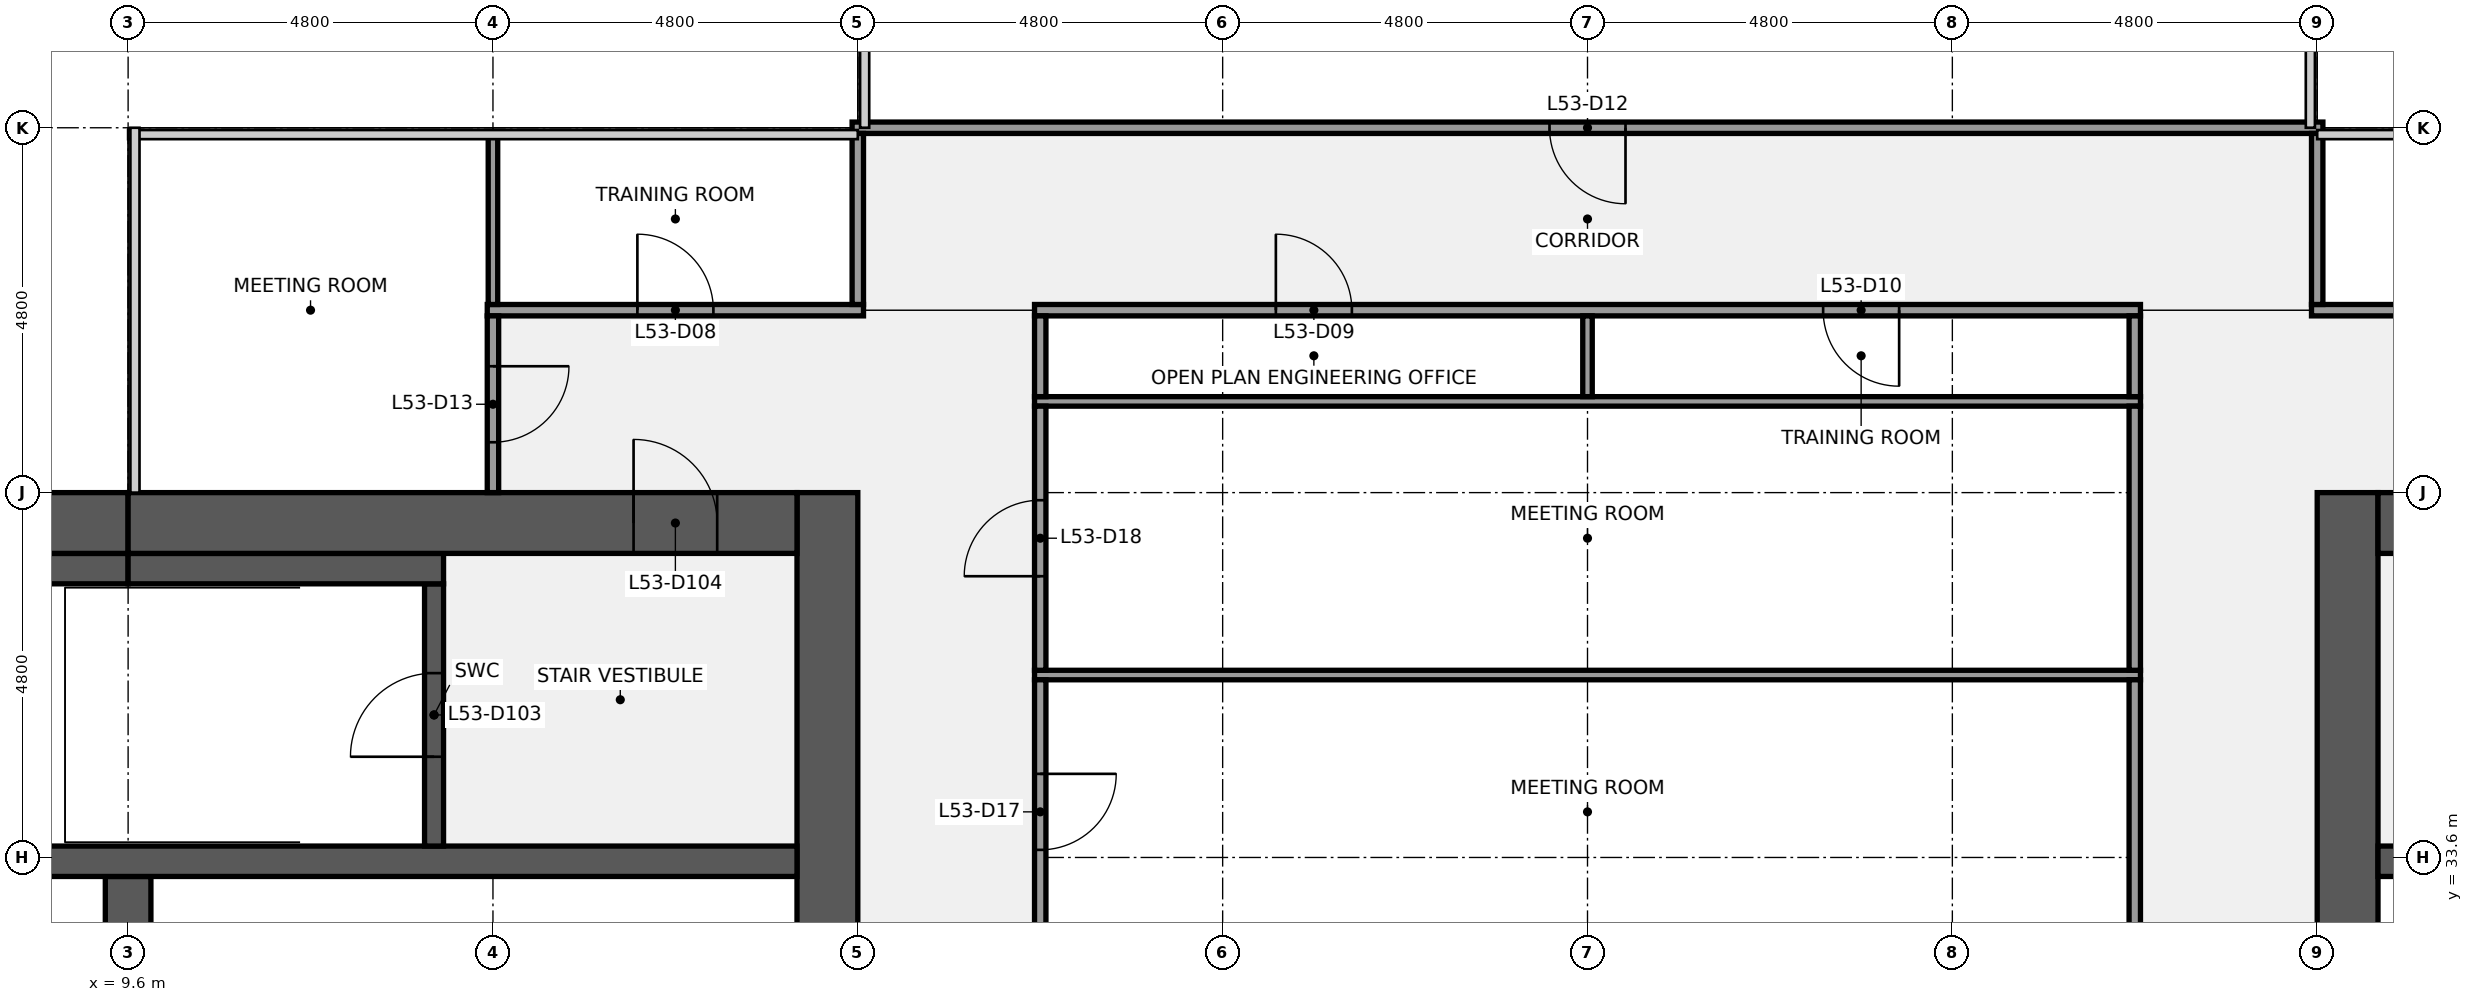
"""IFC4 building model, lengths in metres.
Left out: names, types, materials, properties, quantities, classifications, styles, units other than length and angle.
Written with IfcOpenShell. Run it as: python <this file> out.ifc"""

import sys

from ifc_helpers import new_model, si_unit, direction, frame, frame_2d, origin, place, context, subcontext, project, spatial, rectangle, extrude, element, fill, save


model = new_model("IFC4")
c1 = context("Model", 3, precision=1e-05, world=origin(), true_north=direction((0.0, 1.0)))
c2 = subcontext(c1, "Body", "Model", "MODEL_VIEW")
j1 = project(units=[si_unit("LENGTHUNIT", "METRE"), si_unit("PLANEANGLEUNIT", "RADIAN")], contexts=[c1])
p1 = place(None, origin())
s1 = spatial("IfcSite", under=j1, at=p1, CompositionType="ELEMENT")
p2 = place(p1, origin())
s2 = spatial("IfcBuilding", under=s1, at=p2, CompositionType="ELEMENT")
p3 = place(p2, frame((0.0, 0.0, 241.2)))
s3 = spatial("IfcBuildingStorey", under=s2, at=p3, CompositionType="ELEMENT", Elevation=241.2)
p4 = place(p3, frame((18.8, 38.4, 0.0), z_axis=(0.0, 0.0, 1.0), x_axis=(0.0, -1.0, 0.0)))
e1 = element("IfcWall", 1, at=p4, inside=s3, PredefinedType="SHEAR", context=c2, shape_type="SweptSolid", body=[
    extrude(rectangle(XDim=28.8, YDim=0.8, at=frame_2d((14.4, 0.0))), origin(), (0.0, 0.0, 1.0), 3.84),
])
p5 = place(p4, frame((18.3, 0.0, 0.0)))
e2 = element("IfcOpeningElement", 2, at=p5, cuts=e1, PredefinedType="OPENING", context=c2, shape_type="SweptSolid", body=[
    extrude(rectangle(XDim=1.8, YDim=2.1, at=frame_2d((0.9, 1.05))), frame((0.0, 0.41, 0.0), z_axis=(0.0, -1.0, 0.0), x_axis=(1.0, 0.0, 0.0)), (0.0, 0.0, 1.0), 0.82),
])
p6 = place(p4, frame((8.7, 0.0, 0.0)))
e3 = element("IfcOpeningElement", 3, at=p6, cuts=e1, PredefinedType="OPENING", context=c2, shape_type="SweptSolid", body=[
    extrude(rectangle(XDim=1.8, YDim=2.1, at=frame_2d((0.9, 1.05))), frame((0.0, 0.41, 0.0), z_axis=(0.0, -1.0, 0.0), x_axis=(1.0, 0.0, 0.0)), (0.0, 0.0, 1.0), 0.82),
])
p7 = place(p3, frame((9.6, 30.75, 0.0), z_axis=(0.0, 0.0, 1.0), x_axis=(0.0, 1.0, 0.0)))
e4 = element("IfcWall", 4, at=p7, inside=s3, PredefinedType="SHEAR", context=c2, shape_type="SweptSolid", body=[
    extrude(rectangle(XDim=2.6, YDim=0.6, at=frame_2d((1.3, 0.0))), origin(), (0.0, 0.0, 1.0), 3.84),
])
p8 = place(p3, frame((0.8, 33.55, 0.0), z_axis=(0.0, 0.0, 1.0), x_axis=(1.0, 0.0, 0.0)))
e5 = element("IfcWall", 5, at=p8, inside=s3, PredefinedType="SHEAR", context=c2, shape_type="SweptSolid", body=[
    extrude(rectangle(XDim=17.6, YDim=0.4, at=frame_2d((8.8, 0.0))), origin(), (0.0, 0.0, 1.0), 3.84),
])
p9 = place(p3, frame((13.625, 33.75, 0.0), z_axis=(0.0, 0.0, 1.0), x_axis=(0.0, 1.0, 0.0)))
e6 = element("IfcWall", 6, at=p9, inside=s3, PredefinedType="SHEAR", context=c2, shape_type="SweptSolid", body=[
    extrude(rectangle(XDim=3.45, YDim=0.25, at=frame_2d((1.725, 0.0))), origin(), (0.0, 0.0, 1.0), 3.84),
])
p10 = place(p9, frame((1.175, 0.0, 0.0)))
e7 = element("IfcOpeningElement", 7, at=p10, cuts=e6, PredefinedType="OPENING", context=c2, shape_type="SweptSolid", body=[
    extrude(rectangle(XDim=1.1, YDim=2.1, at=frame_2d((0.55, 1.05))), frame((0.0, 0.135, 0.0), z_axis=(0.0, -1.0, 0.0), x_axis=(1.0, 0.0, 0.0)), (0.0, 0.0, 1.0), 0.27),
])
p11 = place(p3, frame((6.25, 37.4, 0.0), z_axis=(0.0, 0.0, 1.0), x_axis=(1.0, 0.0, 0.0)))
e8 = element("IfcWall", 8, at=p11, inside=s3, PredefinedType="SHEAR", context=c2, shape_type="SweptSolid", body=[
    extrude(rectangle(XDim=3.35, YDim=0.4, at=frame_2d((1.675, 0.0))), origin(), (0.0, 0.0, 1.0), 3.84),
])
p12 = place(p3, frame((9.6, 37.4, 0.0), z_axis=(0.0, 0.0, 1.0), x_axis=(1.0, 0.0, 0.0)))
e9 = element("IfcWall", 9, at=p12, inside=s3, PredefinedType="SHEAR", context=c2, shape_type="SweptSolid", body=[
    extrude(rectangle(XDim=4.15, YDim=0.4, at=frame_2d((2.075, 0.0))), origin(), (0.0, 0.0, 1.0), 3.84),
])
p13 = place(p3, frame((0.8, 38.0, 0.0), z_axis=(0.0, 0.0, 1.0), x_axis=(1.0, 0.0, 0.0)))
e10 = element("IfcWall", 10, at=p13, inside=s3, PredefinedType="SHEAR", context=c2, shape_type="SweptSolid", body=[
    extrude(rectangle(XDim=8.8, YDim=0.8, at=frame_2d((4.4, 0.0))), origin(), (0.0, 0.0, 1.0), 3.84),
])
p14 = place(p13, frame((5.5, 0.0, 0.9)))
e11 = element("IfcOpeningElement", 11, at=p14, cuts=e10, PredefinedType="OPENING", context=c2, shape_type="SweptSolid", body=[
    extrude(rectangle(XDim=1.8, YDim=1.5, at=frame_2d((0.9, 0.75))), frame((0.0, 0.41, 0.0), z_axis=(0.0, -1.0, 0.0), x_axis=(1.0, 0.0, 0.0)), (0.0, 0.0, 1.0), 0.82),
])
p15 = place(p3, frame((9.6, 38.0, 0.0), z_axis=(0.0, 0.0, 1.0), x_axis=(1.0, 0.0, 0.0)))
e12 = element("IfcWall", 12, at=p15, inside=s3, PredefinedType="SHEAR", context=c2, shape_type="SweptSolid", body=[
    extrude(rectangle(XDim=8.8, YDim=0.8, at=frame_2d((4.4, 0.0))), origin(), (0.0, 0.0, 1.0), 3.84),
])
p16 = place(p15, frame((6.65, 0.0, 0.0)))
e13 = element("IfcOpeningElement", 13, at=p16, cuts=e12, PredefinedType="OPENING", context=c2, shape_type="SweptSolid", body=[
    extrude(rectangle(XDim=1.1, YDim=2.1, at=frame_2d((0.55, 1.05))), frame((0.0, 0.41, 0.0), z_axis=(0.0, -1.0, 0.0), x_axis=(1.0, 0.0, 0.0)), (0.0, 0.0, 1.0), 0.82),
])
p17 = place(p3, frame((38.8, 9.6, 0.0), z_axis=(0.0, 0.0, 1.0), x_axis=(0.0, 1.0, 0.0)))
e14 = element("IfcWall", 14, at=p17, inside=s3, PredefinedType="SHEAR", context=c2, shape_type="SweptSolid", body=[
    extrude(rectangle(XDim=28.8, YDim=0.8, at=frame_2d((14.4, 0.0))), origin(), (0.0, 0.0, 1.0), 3.84),
])
p18 = place(p17, frame((8.7, 0.0, 0.0)))
e15 = element("IfcOpeningElement", 15, at=p18, cuts=e14, PredefinedType="OPENING", context=c2, shape_type="SweptSolid", body=[
    extrude(rectangle(XDim=1.8, YDim=2.1, at=frame_2d((0.9, 1.05))), frame((0.0, 0.41, 0.0), z_axis=(0.0, -1.0, 0.0), x_axis=(1.0, 0.0, 0.0)), (0.0, 0.0, 1.0), 0.82),
])
p19 = place(p17, frame((18.3, 0.0, 0.0)))
e16 = element("IfcOpeningElement", 16, at=p19, cuts=e14, PredefinedType="OPENING", context=c2, shape_type="SweptSolid", body=[
    extrude(rectangle(XDim=1.8, YDim=2.1, at=frame_2d((0.9, 1.05))), frame((0.0, 0.41, 0.0), z_axis=(0.0, -1.0, 0.0), x_axis=(1.0, 0.0, 0.0)), (0.0, 0.0, 1.0), 0.82),
])
p20 = place(p3, frame((39.2, 33.55, 0.0), z_axis=(0.0, 0.0, 1.0), x_axis=(1.0, 0.0, 0.0)))
e17 = element("IfcWall", 17, at=p20, inside=s3, PredefinedType="SHEAR", context=c2, shape_type="SweptSolid", body=[
    extrude(rectangle(XDim=17.6, YDim=0.4, at=frame_2d((8.8, 0.0))), origin(), (0.0, 0.0, 1.0), 3.84),
])
p21 = place(p3, frame((39.2, 38.0, 0.0), z_axis=(0.0, 0.0, 1.0), x_axis=(1.0, 0.0, 0.0)))
e18 = element("IfcWall", 18, at=p21, inside=s3, PredefinedType="SHEAR", context=c2, shape_type="SweptSolid", body=[
    extrude(rectangle(XDim=8.8, YDim=0.8, at=frame_2d((4.4, 0.0))), origin(), (0.0, 0.0, 1.0), 3.84),
])
p22 = place(p21, frame((1.05, 0.0, 0.0)))
e19 = element("IfcOpeningElement", 19, at=p22, cuts=e18, PredefinedType="OPENING", context=c2, shape_type="SweptSolid", body=[
    extrude(rectangle(XDim=1.1, YDim=2.1, at=frame_2d((0.55, 1.05))), frame((0.0, 0.41, 0.0), z_axis=(0.0, -1.0, 0.0), x_axis=(1.0, 0.0, 0.0)), (0.0, 0.0, 1.0), 0.82),
])
for number, where, z_axis, x_axis in (
    (20, (21.525, 36.0, 0.0), (0.0, 0.0, 1.0), (1.0, 0.0, 0.0)),
    (21, (21.525, 39.6, 0.0), (0.0, 0.0, 1.0), (1.0, 0.0, 0.0)),
):
    element("IfcWall", number, at=place(p3, frame(where, z_axis=z_axis, x_axis=x_axis)), inside=s3, PredefinedType="PARTITIONING", context=c2, shape_type="SweptSolid", body=[
        extrude(rectangle(XDim=14.55, YDim=0.125, at=frame_2d((7.275, 0.0))), origin(), (0.0, 0.0, 1.0), 2.849),
    ])
p23 = place(p3, frame((14.325, 40.8, 0.0), z_axis=(0.0, 0.0, 1.0), x_axis=(1.0, 0.0, 0.0)))
e22 = element("IfcWall", 22, at=p23, inside=s3, PredefinedType="PARTITIONING", context=c2, shape_type="SweptSolid", body=[
    extrude(rectangle(XDim=4.95, YDim=0.15, at=frame_2d((2.475, 0.0))), origin(), (0.0, 0.0, 1.0), 2.849),
])
p24 = place(p23, frame((1.975, 0.0, 0.0)))
e23 = element("IfcOpeningElement", 23, at=p24, cuts=e22, PredefinedType="OPENING", context=c2, shape_type="SweptSolid", body=[
    extrude(rectangle(XDim=1.0, YDim=2.1, at=frame_2d((0.5, 1.05))), frame((0.0, 0.085, 0.0), z_axis=(0.0, -1.0, 0.0), x_axis=(1.0, 0.0, 0.0)), (0.0, 0.0, 1.0), 0.17),
])
p25 = place(p3, frame((21.525, 40.8, 0.0), z_axis=(0.0, 0.0, 1.0), x_axis=(1.0, 0.0, 0.0)))
e24 = element("IfcWall", 24, at=p25, inside=s3, PredefinedType="PARTITIONING", context=c2, shape_type="SweptSolid", body=[
    extrude(rectangle(XDim=14.55, YDim=0.15, at=frame_2d((7.275, 0.0))), origin(), (0.0, 0.0, 1.0), 2.849),
])
p26 = place(p25, frame((3.175, 0.0, 0.0)))
e25 = element("IfcOpeningElement", 25, at=p26, cuts=e24, PredefinedType="OPENING", context=c2, shape_type="SweptSolid", body=[
    extrude(rectangle(XDim=1.0, YDim=2.1, at=frame_2d((0.5, 1.05))), frame((0.0, 0.085, 0.0), z_axis=(0.0, -1.0, 0.0), x_axis=(1.0, 0.0, 0.0)), (0.0, 0.0, 1.0), 0.17),
])
p27 = place(p25, frame((10.375, 0.0, 0.0)))
e26 = element("IfcOpeningElement", 26, at=p27, cuts=e24, PredefinedType="OPENING", context=c2, shape_type="SweptSolid", body=[
    extrude(rectangle(XDim=1.0, YDim=2.1, at=frame_2d((0.5, 1.05))), frame((0.0, 0.085, 0.0), z_axis=(0.0, -1.0, 0.0), x_axis=(1.0, 0.0, 0.0)), (0.0, 0.0, 1.0), 0.17),
])
p28 = place(p3, frame((38.325, 40.8, 0.0), z_axis=(0.0, 0.0, 1.0), x_axis=(1.0, 0.0, 0.0)))
e27 = element("IfcWall", 27, at=p28, inside=s3, PredefinedType="PARTITIONING", context=c2, shape_type="SweptSolid", body=[
    extrude(rectangle(XDim=4.95, YDim=0.15, at=frame_2d((2.475, 0.0))), origin(), (0.0, 0.0, 1.0), 2.849),
])
p29 = place(p28, frame((1.975, 0.0, 0.0)))
e28 = element("IfcOpeningElement", 28, at=p29, cuts=e27, PredefinedType="OPENING", context=c2, shape_type="SweptSolid", body=[
    extrude(rectangle(XDim=1.0, YDim=2.1, at=frame_2d((0.5, 1.05))), frame((0.0, 0.085, 0.0), z_axis=(0.0, -1.0, 0.0), x_axis=(1.0, 0.0, 0.0)), (0.0, 0.0, 1.0), 0.17),
])
p30 = place(p3, frame((19.125, 43.2, 0.0), z_axis=(0.0, 0.0, 1.0), x_axis=(1.0, 0.0, 0.0)))
e29 = element("IfcWall", 29, at=p30, inside=s3, PredefinedType="PARTITIONING", context=c2, shape_type="SweptSolid", body=[
    extrude(rectangle(XDim=19.35, YDim=0.15, at=frame_2d((9.675, 0.0))), origin(), (0.0, 0.0, 1.0), 2.849),
])
p31 = place(p30, frame((9.175, 0.0, 0.0)))
e30 = element("IfcOpeningElement", 30, at=p31, cuts=e29, PredefinedType="OPENING", context=c2, shape_type="SweptSolid", body=[
    extrude(rectangle(XDim=1.0, YDim=2.1, at=frame_2d((0.5, 1.05))), frame((0.0, 0.085, 0.0), z_axis=(0.0, -1.0, 0.0), x_axis=(1.0, 0.0, 0.0)), (0.0, 0.0, 1.0), 0.17),
])
p32 = place(p3, frame((14.4, 40.875, 0.0), z_axis=(0.0, 0.0, 1.0), x_axis=(0.0, 1.0, 0.0)))
e31 = element("IfcWall", 31, at=p32, inside=s3, PredefinedType="PARTITIONING", context=c2, shape_type="SweptSolid", body=[
    extrude(rectangle(XDim=2.225, YDim=0.125, at=frame_2d((1.113, 0.0))), origin(), (0.0, 0.0, 1.0), 2.849),
])
p33 = place(p3, frame((14.4, 38.4, 0.0), z_axis=(0.0, 0.0, 1.0), x_axis=(0.0, 1.0, 0.0)))
e32 = element("IfcWall", 32, at=p33, inside=s3, PredefinedType="PARTITIONING", context=c2, shape_type="SweptSolid", body=[
    extrude(rectangle(XDim=2.325, YDim=0.15, at=frame_2d((1.163, 0.0))), origin(), (0.0, 0.0, 1.0), 2.849),
])
p34 = place(p33, frame((0.663, 0.0, 0.0)))
e33 = element("IfcOpeningElement", 33, at=p34, cuts=e32, PredefinedType="OPENING", context=c2, shape_type="SweptSolid", body=[
    extrude(rectangle(XDim=1.0, YDim=2.1, at=frame_2d((0.5, 1.05))), frame((0.0, 0.085, 0.0), z_axis=(0.0, -1.0, 0.0), x_axis=(1.0, 0.0, 0.0)), (0.0, 0.0, 1.0), 0.17),
])
p35 = place(p3, frame((19.2, 40.875, 0.0), z_axis=(0.0, 0.0, 1.0), x_axis=(0.0, 1.0, 0.0)))
e34 = element("IfcWall", 34, at=p35, inside=s3, PredefinedType="PARTITIONING", context=c2, shape_type="SweptSolid", body=[
    extrude(rectangle(XDim=2.25, YDim=0.15, at=frame_2d((1.125, 0.0))), origin(), (0.0, 0.0, 1.0), 2.849),
])
p36 = place(p3, frame((21.6, 32.462, 0.0), z_axis=(0.0, 0.0, 1.0), x_axis=(0.0, 1.0, 0.0)))
e35 = element("IfcWall", 35, at=p36, inside=s3, PredefinedType="PARTITIONING", context=c2, shape_type="SweptSolid", body=[
    extrude(rectangle(XDim=3.475, YDim=0.15, at=frame_2d((1.738, 0.0))), origin(), (0.0, 0.0, 1.0), 2.849),
])
p37 = place(p36, frame((1.238, 0.0, 0.0)))
e36 = element("IfcOpeningElement", 36, at=p37, cuts=e35, PredefinedType="OPENING", context=c2, shape_type="SweptSolid", body=[
    extrude(rectangle(XDim=1.0, YDim=2.1, at=frame_2d((0.5, 1.05))), frame((0.0, 0.085, 0.0), z_axis=(0.0, -1.0, 0.0), x_axis=(1.0, 0.0, 0.0)), (0.0, 0.0, 1.0), 0.17),
])
p38 = place(p3, frame((21.6, 36.062, 0.0), z_axis=(0.0, 0.0, 1.0), x_axis=(0.0, 1.0, 0.0)))
e37 = element("IfcWall", 37, at=p38, inside=s3, PredefinedType="PARTITIONING", context=c2, shape_type="SweptSolid", body=[
    extrude(rectangle(XDim=3.475, YDim=0.15, at=frame_2d((1.738, 0.0))), origin(), (0.0, 0.0, 1.0), 2.849),
])
p39 = place(p38, frame((1.238, 0.0, 0.0)))
e38 = element("IfcOpeningElement", 38, at=p39, cuts=e37, PredefinedType="OPENING", context=c2, shape_type="SweptSolid", body=[
    extrude(rectangle(XDim=1.0, YDim=2.1, at=frame_2d((0.5, 1.05))), frame((0.0, 0.085, 0.0), z_axis=(0.0, -1.0, 0.0), x_axis=(1.0, 0.0, 0.0)), (0.0, 0.0, 1.0), 0.17),
])
p40 = place(p3, frame((21.6, 39.663, 0.0), z_axis=(0.0, 0.0, 1.0), x_axis=(0.0, 1.0, 0.0)))
e39 = element("IfcWall", 39, at=p40, inside=s3, PredefinedType="PARTITIONING", context=c2, shape_type="SweptSolid", body=[
    extrude(rectangle(XDim=1.062, YDim=0.15, at=frame_2d((0.531, 0.0))), origin(), (0.0, 0.0, 1.0), 2.849),
])
p41 = place(p3, frame((28.8, 39.663, 0.0), z_axis=(0.0, 0.0, 1.0), x_axis=(0.0, 1.0, 0.0)))
e40 = element("IfcWall", 40, at=p41, inside=s3, PredefinedType="PARTITIONING", context=c2, shape_type="SweptSolid", body=[
    extrude(rectangle(XDim=1.062, YDim=0.125, at=frame_2d((0.531, 0.0))), origin(), (0.0, 0.0, 1.0), 2.849),
])
for number, where, z_axis, x_axis in (
    (41, (36.0, 32.462, 0.0), (0.0, 0.0, 1.0), (0.0, 1.0, 0.0)),
    (42, (36.0, 36.062, 0.0), (0.0, 0.0, 1.0), (0.0, 1.0, 0.0)),
):
    element("IfcWall", number, at=place(p3, frame(where, z_axis=z_axis, x_axis=x_axis)), inside=s3, PredefinedType="PARTITIONING", context=c2, shape_type="SweptSolid", body=[
        extrude(rectangle(XDim=3.475, YDim=0.15, at=frame_2d((1.738, 0.0))), origin(), (0.0, 0.0, 1.0), 2.849),
    ])
p42 = place(p3, frame((36.0, 39.663, 0.0), z_axis=(0.0, 0.0, 1.0), x_axis=(0.0, 1.0, 0.0)))
e43 = element("IfcWall", 43, at=p42, inside=s3, PredefinedType="PARTITIONING", context=c2, shape_type="SweptSolid", body=[
    extrude(rectangle(XDim=1.062, YDim=0.15, at=frame_2d((0.531, 0.0))), origin(), (0.0, 0.0, 1.0), 2.849),
])
p43 = place(p3, frame((38.4, 40.875, 0.0), z_axis=(0.0, 0.0, 1.0), x_axis=(0.0, 1.0, 0.0)))
e44 = element("IfcWall", 44, at=p43, inside=s3, PredefinedType="PARTITIONING", context=c2, shape_type="SweptSolid", body=[
    extrude(rectangle(XDim=2.25, YDim=0.15, at=frame_2d((1.125, 0.0))), origin(), (0.0, 0.0, 1.0), 2.849),
])
p44 = place(p10, origin())
e45 = element("IfcDoor", 45, at=p44, inside=s3, OperationType="SINGLE_SWING_LEFT", PredefinedType="DOOR", context=c2, shape_type="SweptSolid", body=[
    extrude(rectangle(XDim=1.1, YDim=2.1, at=frame_2d((0.55, 1.05))), frame((0.0, 0.025, 0.0), z_axis=(0.0, -1.0, 0.0), x_axis=(1.0, 0.0, 0.0)), (0.0, 0.0, 1.0), 0.05),
])
fill(e7, e45)
p45 = place(p16, origin())
e46 = element("IfcDoor", 46, at=p45, inside=s3, OperationType="SINGLE_SWING_LEFT", PredefinedType="DOOR", context=c2, shape_type="SweptSolid", body=[
    extrude(rectangle(XDim=1.1, YDim=2.1, at=frame_2d((0.55, 1.05))), frame((0.0, 0.025, 0.0), z_axis=(0.0, -1.0, 0.0), x_axis=(1.0, 0.0, 0.0)), (0.0, 0.0, 1.0), 0.05),
])
fill(e13, e46)
p46 = place(p24, origin())
e47 = element("IfcDoor", 47, at=p46, inside=s3, OperationType="SINGLE_SWING_LEFT", PredefinedType="DOOR", context=c2, shape_type="SweptSolid", body=[
    extrude(rectangle(XDim=1.0, YDim=2.1, at=frame_2d((0.5, 1.05))), frame((0.0, 0.025, 0.0), z_axis=(0.0, -1.0, 0.0), x_axis=(1.0, 0.0, 0.0)), (0.0, 0.0, 1.0), 0.05),
])
fill(e23, e47)
p47 = place(p26, origin())
e48 = element("IfcDoor", 48, at=p47, inside=s3, OperationType="SINGLE_SWING_LEFT", PredefinedType="DOOR", context=c2, shape_type="SweptSolid", body=[
    extrude(rectangle(XDim=1.0, YDim=2.1, at=frame_2d((0.5, 1.05))), frame((0.0, 0.025, 0.0), z_axis=(0.0, -1.0, 0.0), x_axis=(1.0, 0.0, 0.0)), (0.0, 0.0, 1.0), 0.05),
])
fill(e25, e48)
p48 = place(p27, origin())
e49 = element("IfcDoor", 49, at=p48, inside=s3, OperationType="SINGLE_SWING_RIGHT", PredefinedType="DOOR", context=c2, shape_type="SweptSolid", body=[
    extrude(rectangle(XDim=1.0, YDim=2.1, at=frame_2d((0.5, 1.05))), frame((0.0, 0.025, 0.0), z_axis=(0.0, -1.0, 0.0), x_axis=(1.0, 0.0, 0.0)), (0.0, 0.0, 1.0), 0.05),
])
fill(e26, e49)
p49 = place(p31, origin())
e50 = element("IfcDoor", 50, at=p49, inside=s3, OperationType="SINGLE_SWING_RIGHT", PredefinedType="DOOR", context=c2, shape_type="SweptSolid", body=[
    extrude(rectangle(XDim=1.0, YDim=2.1, at=frame_2d((0.5, 1.05))), frame((0.0, 0.025, 0.0), z_axis=(0.0, -1.0, 0.0), x_axis=(1.0, 0.0, 0.0)), (0.0, 0.0, 1.0), 0.05),
])
fill(e30, e50)
p50 = place(p34, origin())
e51 = element("IfcDoor", 51, at=p50, inside=s3, OperationType="SINGLE_SWING_RIGHT", PredefinedType="DOOR", context=c2, shape_type="SweptSolid", body=[
    extrude(rectangle(XDim=1.0, YDim=2.1, at=frame_2d((0.5, 1.05))), frame((0.0, 0.025, 0.0), z_axis=(0.0, -1.0, 0.0), x_axis=(1.0, 0.0, 0.0)), (0.0, 0.0, 1.0), 0.05),
])
fill(e33, e51)
p51 = place(p37, origin())
e52 = element("IfcDoor", 52, at=p51, inside=s3, OperationType="SINGLE_SWING_RIGHT", PredefinedType="DOOR", context=c2, shape_type="SweptSolid", body=[
    extrude(rectangle(XDim=1.0, YDim=2.1, at=frame_2d((0.5, 1.05))), frame((0.0, 0.025, 0.0), z_axis=(0.0, -1.0, 0.0), x_axis=(1.0, 0.0, 0.0)), (0.0, 0.0, 1.0), 0.05),
])
fill(e36, e52)
p52 = place(p39, origin())
e53 = element("IfcDoor", 53, at=p52, inside=s3, OperationType="SINGLE_SWING_LEFT", PredefinedType="DOOR", context=c2, shape_type="SweptSolid", body=[
    extrude(rectangle(XDim=1.0, YDim=2.1, at=frame_2d((0.5, 1.05))), frame((0.0, 0.025, 0.0), z_axis=(0.0, -1.0, 0.0), x_axis=(1.0, 0.0, 0.0)), (0.0, 0.0, 1.0), 0.05),
])
fill(e38, e53)
save(model, sys.argv[1])
